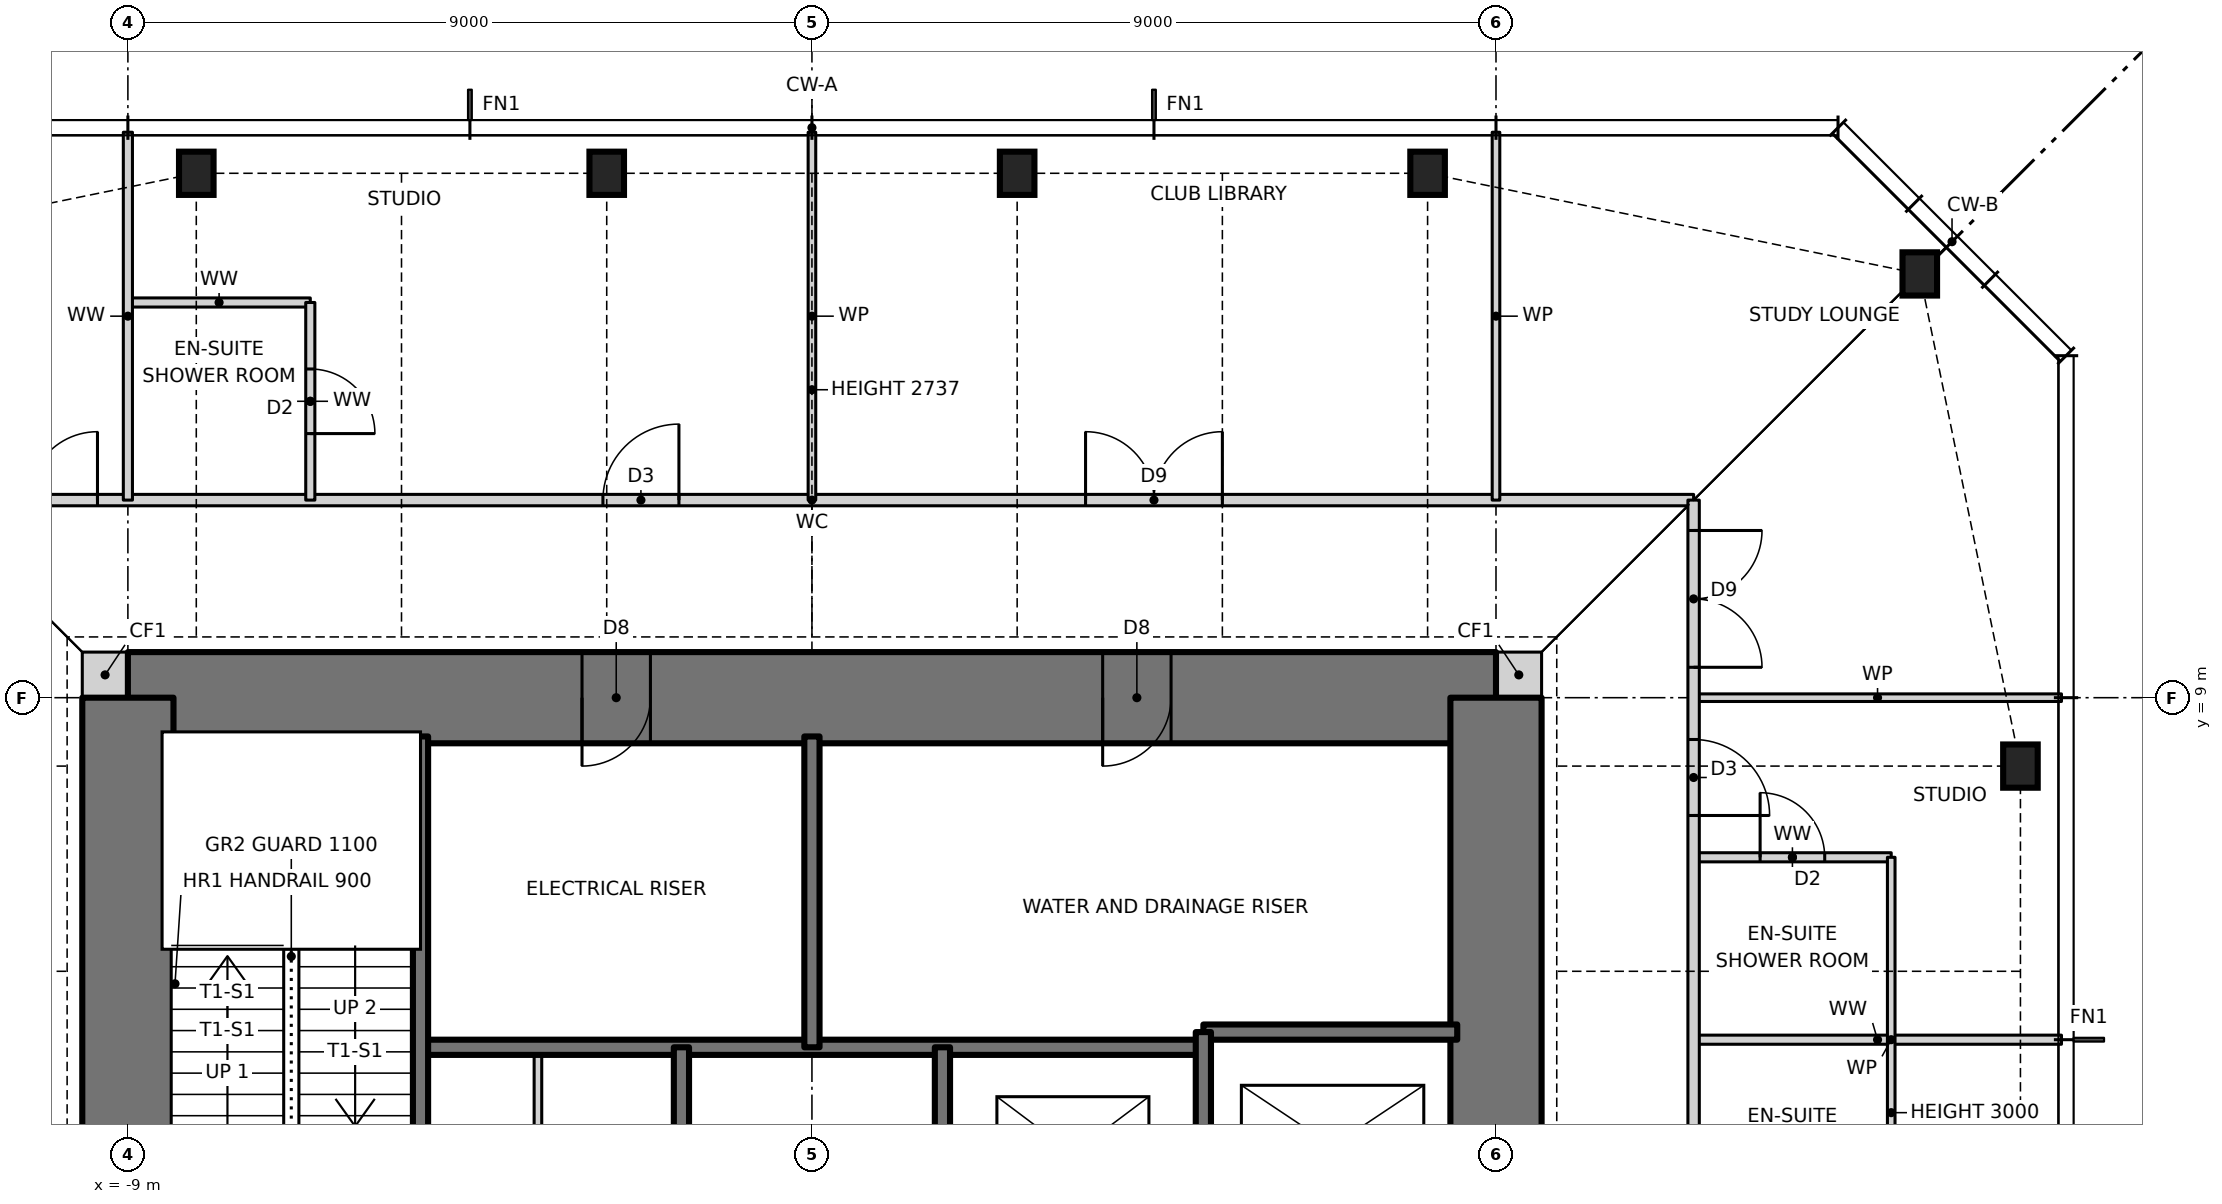
"""IFC4 building model, lengths in metres.
Left out: names, types, materials, properties, quantities, classifications, styles, units other than length and angle.
Written with IfcOpenShell. Run it as: python <this file> out.ifc"""

import sys

from ifc_helpers import new_model, si_unit, direction, frame, frame_2d, origin, origin_2d, place, context, subcontext, project, spatial, rectangle, i_section, extrude, element, fill, save


model = new_model("IFC4")
c1 = context("Model", 3, precision=1e-05, world=origin(), true_north=direction((0.0, 1.0)))
c2 = subcontext(c1, "Body", "Model", "MODEL_VIEW")
j1 = project(units=[si_unit("LENGTHUNIT", "METRE"), si_unit("PLANEANGLEUNIT", "RADIAN")], contexts=[c1])
p1 = place(None, origin())
s1 = spatial("IfcSite", under=j1, at=p1, CompositionType="ELEMENT")
p2 = place(p1, origin())
s2 = spatial("IfcBuilding", under=s1, at=p2, CompositionType="ELEMENT")
p3 = place(p2, frame((0.0, 0.0, 260.5)))
s3 = spatial("IfcBuildingStorey", under=s2, at=p3, CompositionType="ELEMENT", Elevation=260.5)
for number, where, z_axis, x_axis in (
    (1, (15.9, 8.1, 0.0), (0.0, 0.0, 1.0), (1.0, 0.0, 0.0)),
    (2, (14.576, 14.576, 0.0), (0.0, 0.0, 1.0), (1.0, 0.0, 0.0)),
    (3, (8.1, 15.9, 0.0), (0.0, 0.0, 1.0), (1.0, 0.0, 0.0)),
    (4, (2.7, 15.9, 0.0), (0.0, 0.0, 1.0), (1.0, 0.0, 0.0)),
    (5, (-2.7, 15.9, 0.0), (0.0, 0.0, 1.0), (1.0, 0.0, 0.0)),
    (6, (-8.1, 15.9, 0.0), (0.0, 0.0, 1.0), (1.0, 0.0, 0.0)),
):
    element("IfcColumn", number, at=place(p3, frame(where, z_axis=z_axis, x_axis=x_axis)), inside=s3, PredefinedType="COLUMN", context=c2, shape_type="SweptSolid", body=[
        extrude(i_section(OverallWidth=0.455, OverallDepth=0.569, WebThickness=0.078, FlangeThickness=0.125, at=origin_2d()), origin(), (0.0, 0.0, 1.0), 3.5),
    ])
for number, where, z_axis, x_axis in (
    (7, (9.0, 9.3, 0.0), (0.0, 0.0, 1.0), (1.0, 0.0, 0.0)),
    (8, (-9.6, 9.3, 0.0), (0.0, 0.0, 1.0), (1.0, 0.0, 0.0)),
):
    element("IfcWall", number, at=place(p3, frame(where, z_axis=z_axis, x_axis=x_axis)), inside=s3, PredefinedType="SOLIDWALL", context=c2, shape_type="SweptSolid", body=[
        extrude(rectangle(XDim=0.6, YDim=0.6, at=frame_2d((0.3, 0.0))), origin(), (0.0, 0.0, 1.0), 3.5),
    ])
p4 = place(p3, frame((9.0, 9.0, 0.0), z_axis=(0.0, 0.0, 1.0), x_axis=(-1.0, 0.0, 0.0)))
e9 = element("IfcWall", 9, at=p4, inside=s3, PredefinedType="SHEAR", context=c2, shape_type="SweptSolid", body=[
    extrude(rectangle(XDim=18.0, YDim=1.2, at=frame_2d((9.0, 0.0))), origin(), (0.0, 0.0, 1.0), 3.5),
])
p5 = place(p4, frame((11.125, 0.0, 0.0)))
e10 = element("IfcOpeningElement", 10, at=p5, cuts=e9, PredefinedType="OPENING", context=c2, shape_type="SweptSolid", body=[
    extrude(rectangle(XDim=0.9, YDim=2.1, at=frame_2d((0.45, 1.05))), frame((0.0, 0.61, 0.0), z_axis=(0.0, -1.0, 0.0), x_axis=(1.0, 0.0, 0.0)), (0.0, 0.0, 1.0), 1.22),
])
p6 = place(p4, frame((4.275, 0.0, 0.0)))
e11 = element("IfcOpeningElement", 11, at=p6, cuts=e9, PredefinedType="OPENING", context=c2, shape_type="SweptSolid", body=[
    extrude(rectangle(XDim=0.9, YDim=2.1, at=frame_2d((0.45, 1.05))), frame((0.0, 0.61, 0.0), z_axis=(0.0, -1.0, 0.0), x_axis=(1.0, 0.0, 0.0)), (0.0, 0.0, 1.0), 1.22),
])
p7 = place(p3, frame((9.0, -9.0, 0.0), z_axis=(0.0, 0.0, 1.0), x_axis=(0.0, 1.0, 0.0)))
e12 = element("IfcWall", 12, at=p7, inside=s3, PredefinedType="SHEAR", context=c2, shape_type="SweptSolid", body=[
    extrude(rectangle(XDim=18.0, YDim=1.2, at=frame_2d((9.0, 0.0))), origin(), (0.0, 0.0, 1.0), 3.5),
])
p8 = place(p7, frame((8.5, 0.0, 0.0)))
e13 = element("IfcOpeningElement", 13, at=p8, cuts=e12, PredefinedType="OPENING", context=c2, shape_type="SweptSolid", body=[
    extrude(rectangle(XDim=1.0, YDim=2.1, at=frame_2d((0.5, 1.05))), frame((0.0, 0.61, 0.0), z_axis=(0.0, -1.0, 0.0), x_axis=(1.0, 0.0, 0.0)), (0.0, 0.0, 1.0), 1.22),
])
p9 = place(p3, frame((-9.0, 9.0, 0.0), z_axis=(0.0, 0.0, 1.0), x_axis=(0.0, -1.0, 0.0)))
e14 = element("IfcWall", 14, at=p9, inside=s3, PredefinedType="SHEAR", context=c2, shape_type="SweptSolid", body=[
    extrude(rectangle(XDim=18.0, YDim=1.2, at=frame_2d((9.0, 0.0))), origin(), (0.0, 0.0, 1.0), 3.5),
])
p10 = place(p9, frame((8.5, 0.0, 0.0)))
e15 = element("IfcOpeningElement", 15, at=p10, cuts=e14, PredefinedType="OPENING", context=c2, shape_type="SweptSolid", body=[
    extrude(rectangle(XDim=1.0, YDim=2.1, at=frame_2d((0.5, 1.05))), frame((0.0, 0.61, 0.0), z_axis=(0.0, -1.0, 0.0), x_axis=(1.0, 0.0, 0.0)), (0.0, 0.0, 1.0), 1.22),
])
p11 = place(p3, frame((-5.15, 4.4, 0.0), z_axis=(0.0, 0.0, 1.0), x_axis=(1.0, 0.0, 0.0)))
e16 = element("IfcWall", 16, at=p11, inside=s3, PredefinedType="SOLIDWALL", context=c2, shape_type="SweptSolid", body=[
    extrude(rectangle(XDim=10.3, YDim=0.2, at=frame_2d((5.15, 0.0))), origin(), (0.0, 0.0, 1.0), 3.5),
])
p12 = place(p3, frame((11.6, 4.5, 0.0), z_axis=(0.0, 0.0, 1.0), x_axis=(1.0, 0.0, 0.0)))
e17 = element("IfcWall", 17, at=p12, inside=s3, PredefinedType="PARTITIONING", context=c2, shape_type="SweptSolid", body=[
    extrude(rectangle(XDim=4.84, YDim=0.12, at=frame_2d((2.42, 0.0))), origin(), (0.0, 0.0, 1.0), 3.27),
])
p13 = place(p3, frame((5.15, 4.6, 0.0), z_axis=(0.0, 0.0, 1.0), x_axis=(1.0, 0.0, 0.0)))
e18 = element("IfcWall", 18, at=p13, inside=s3, PredefinedType="SOLIDWALL", context=c2, shape_type="SweptSolid", body=[
    extrude(rectangle(XDim=3.34, YDim=0.2, at=frame_2d((1.67, 0.0))), origin(), (0.0, 0.0, 1.0), 3.5),
])
p14 = place(p3, frame((11.6, 6.9, 0.0), z_axis=(0.0, 0.0, 1.0), x_axis=(1.0, 0.0, 0.0)))
e19 = element("IfcWall", 19, at=p14, inside=s3, PredefinedType="PARTITIONING", context=c2, shape_type="SweptSolid", body=[
    extrude(rectangle(XDim=2.6, YDim=0.12, at=frame_2d((1.3, 0.0))), origin(), (0.0, 0.0, 1.0), 3.27),
])
p15 = place(p14, frame((0.875, 0.0, 0.0)))
e20 = element("IfcOpeningElement", 20, at=p15, cuts=e19, PredefinedType="OPENING", context=c2, shape_type="SweptSolid", body=[
    extrude(rectangle(XDim=0.85, YDim=2.1, at=frame_2d((0.425, 1.05))), frame((0.0, 0.07, 0.0), z_axis=(0.0, -1.0, 0.0), x_axis=(1.0, 0.0, 0.0)), (0.0, 0.0, 1.0), 0.14),
])
p16 = place(p3, frame((11.6, 9.0, 0.0), z_axis=(0.0, 0.0, 1.0), x_axis=(1.0, 0.0, 0.0)))
e21 = element("IfcWall", 21, at=p16, inside=s3, PredefinedType="PARTITIONING", context=c2, shape_type="SweptSolid", body=[
    extrude(rectangle(XDim=4.84, YDim=0.1, at=frame_2d((2.42, 0.0))), origin(), (0.0, 0.0, 1.0), 3.27),
])
p17 = place(p3, frame((-11.6, 11.6, 0.0), z_axis=(0.0, 0.0, 1.0), x_axis=(1.0, 0.0, 0.0)))
e22 = element("IfcWall", 22, at=p17, inside=s3, PredefinedType="PARTITIONING", context=c2, shape_type="SweptSolid", body=[
    extrude(rectangle(XDim=23.2, YDim=0.15, at=frame_2d((11.6, 0.0))), origin(), (0.0, 0.0, 1.0), 3.27),
])
p18 = place(p17, frame((15.2, 0.0, 0.0)))
e23 = element("IfcOpeningElement", 23, at=p18, cuts=e22, PredefinedType="OPENING", context=c2, shape_type="SweptSolid", body=[
    extrude(rectangle(XDim=1.8, YDim=2.1, at=frame_2d((0.9, 1.05))), frame((0.0, 0.085, 0.0), z_axis=(0.0, -1.0, 0.0), x_axis=(1.0, 0.0, 0.0)), (0.0, 0.0, 1.0), 0.17),
])
p19 = place(p17, frame((8.85, 0.0, 0.0)))
e24 = element("IfcOpeningElement", 24, at=p19, cuts=e22, PredefinedType="OPENING", context=c2, shape_type="SweptSolid", body=[
    extrude(rectangle(XDim=1.0, YDim=2.1, at=frame_2d((0.5, 1.05))), frame((0.0, 0.085, 0.0), z_axis=(0.0, -1.0, 0.0), x_axis=(1.0, 0.0, 0.0)), (0.0, 0.0, 1.0), 0.17),
])
p20 = place(p17, frame((0.4, 0.0, 0.0)))
e25 = element("IfcOpeningElement", 25, at=p20, cuts=e22, PredefinedType="OPENING", context=c2, shape_type="SweptSolid", body=[
    extrude(rectangle(XDim=1.8, YDim=2.1, at=frame_2d((0.9, 1.05))), frame((0.0, 0.085, 0.0), z_axis=(0.0, -1.0, 0.0), x_axis=(1.0, 0.0, 0.0)), (0.0, 0.0, 1.0), 0.17),
])
p21 = place(p3, frame((-9.0, 14.2, 0.0), z_axis=(0.0, 0.0, 1.0), x_axis=(1.0, 0.0, 0.0)))
e26 = element("IfcWall", 26, at=p21, inside=s3, PredefinedType="PARTITIONING", context=c2, shape_type="SweptSolid", body=[
    extrude(rectangle(XDim=2.4, YDim=0.12, at=frame_2d((1.2, 0.0))), origin(), (0.0, 0.0, 1.0), 3.27),
])
p22 = place(p3, frame((14.2, 2.1, 0.0), z_axis=(0.0, 0.0, 1.0), x_axis=(0.0, 1.0, 0.0)))
e27 = element("IfcWall", 27, at=p22, inside=s3, PredefinedType="PARTITIONING", context=c2, shape_type="SweptSolid", body=[
    extrude(rectangle(XDim=4.8, YDim=0.1, at=frame_2d((2.4, 0.0))), origin(), (0.0, 0.0, 1.0), 3.0),
])
p23 = place(p3, frame((11.6, -12.1, 0.0), z_axis=(0.0, 0.0, 1.0), x_axis=(0.0, 1.0, 0.0)))
e28 = element("IfcWall", 28, at=p23, inside=s3, PredefinedType="PARTITIONING", context=c2, shape_type="SweptSolid", body=[
    extrude(rectangle(XDim=23.7, YDim=0.15, at=frame_2d((11.85, 0.0))), origin(), (0.0, 0.0, 1.0), 3.27),
])
p24 = place(p23, frame((6.2, 0.0, 0.0)))
e29 = element("IfcOpeningElement", 29, at=p24, cuts=e28, PredefinedType="OPENING", context=c2, shape_type="SweptSolid", body=[
    extrude(rectangle(XDim=1.0, YDim=2.1, at=frame_2d((0.5, 1.05))), frame((0.0, 0.085, 0.0), z_axis=(0.0, -1.0, 0.0), x_axis=(1.0, 0.0, 0.0)), (0.0, 0.0, 1.0), 0.17),
])
p25 = place(p23, frame((12.65, 0.0, 0.0)))
e30 = element("IfcOpeningElement", 30, at=p25, cuts=e28, PredefinedType="OPENING", context=c2, shape_type="SweptSolid", body=[
    extrude(rectangle(XDim=1.0, YDim=2.1, at=frame_2d((0.5, 1.05))), frame((0.0, 0.085, 0.0), z_axis=(0.0, -1.0, 0.0), x_axis=(1.0, 0.0, 0.0)), (0.0, 0.0, 1.0), 0.17),
])
p26 = place(p23, frame((19.55, 0.0, 0.0)))
e31 = element("IfcOpeningElement", 31, at=p26, cuts=e28, PredefinedType="OPENING", context=c2, shape_type="SweptSolid", body=[
    extrude(rectangle(XDim=1.0, YDim=2.1, at=frame_2d((0.5, 1.05))), frame((0.0, 0.085, 0.0), z_axis=(0.0, -1.0, 0.0), x_axis=(1.0, 0.0, 0.0)), (0.0, 0.0, 1.0), 0.17),
])
p27 = place(p23, frame((21.5, 0.0, 0.0)))
e32 = element("IfcOpeningElement", 32, at=p27, cuts=e28, PredefinedType="OPENING", context=c2, shape_type="SweptSolid", body=[
    extrude(rectangle(XDim=1.8, YDim=2.1, at=frame_2d((0.9, 1.05))), frame((0.0, 0.085, 0.0), z_axis=(0.0, -1.0, 0.0), x_axis=(1.0, 0.0, 0.0)), (0.0, 0.0, 1.0), 0.17),
])
p28 = place(p23, frame((1.125, 0.0, 0.0)))
e33 = element("IfcOpeningElement", 33, at=p28, cuts=e28, PredefinedType="OPENING", context=c2, shape_type="SweptSolid", body=[
    extrude(rectangle(XDim=0.85, YDim=2.1, at=frame_2d((0.425, 1.05))), frame((0.0, 0.085, 0.0), z_axis=(0.0, -1.0, 0.0), x_axis=(1.0, 0.0, 0.0)), (0.0, 0.0, 1.0), 0.17),
])
p29 = place(p3, frame((9.0, 11.6, 0.0), z_axis=(0.0, 0.0, 1.0), x_axis=(0.0, 1.0, 0.0)))
e34 = element("IfcWall", 34, at=p29, inside=s3, PredefinedType="PARTITIONING", context=c2, shape_type="SweptSolid", body=[
    extrude(rectangle(XDim=4.84, YDim=0.1, at=frame_2d((2.42, 0.0))), origin(), (0.0, 0.0, 1.0), 3.27),
])
p30 = place(p3, frame((5.15, -8.49, 0.0), z_axis=(0.0, 0.0, 1.0), x_axis=(0.0, 1.0, 0.0)))
e35 = element("IfcWall", 35, at=p30, inside=s3, PredefinedType="SOLIDWALL", context=c2, shape_type="SweptSolid", body=[
    extrude(rectangle(XDim=13.09, YDim=0.2, at=frame_2d((6.545, 0.0))), origin(), (0.0, 0.0, 1.0), 3.5),
])
p31 = place(p30, frame((7.89, 0.0, 0.0)))
e36 = element("IfcOpeningElement", 36, at=p31, cuts=e35, PredefinedType="OPENING", context=c2, shape_type="SweptSolid", body=[
    extrude(rectangle(XDim=1.2, YDim=2.1, at=frame_2d((0.6, 1.05))), frame((0.0, 0.11, 0.0), z_axis=(0.0, -1.0, 0.0), x_axis=(1.0, 0.0, 0.0)), (0.0, 0.0, 1.0), 0.22),
])
p32 = place(p3, frame((1.717, 1.6, 0.0), z_axis=(0.0, 0.0, 1.0), x_axis=(0.0, 1.0, 0.0)))
e37 = element("IfcWall", 37, at=p32, inside=s3, PredefinedType="SOLIDWALL", context=c2, shape_type="SweptSolid", body=[
    extrude(rectangle(XDim=2.8, YDim=0.2, at=frame_2d((1.4, 0.0))), origin(), (0.0, 0.0, 1.0), 3.5),
])
p33 = place(p3, frame((0.0, 4.4, 0.0), z_axis=(0.0, 0.0, 1.0), x_axis=(0.0, 1.0, 0.0)))
e38 = element("IfcWall", 38, at=p33, inside=s3, PredefinedType="SOLIDWALL", context=c2, shape_type="SweptSolid", body=[
    extrude(rectangle(XDim=4.09, YDim=0.2, at=frame_2d((2.045, 0.0))), origin(), (0.0, 0.0, 1.0), 3.5),
])
p34 = place(p3, frame((0.0, 11.6, 0.0), z_axis=(0.0, 0.0, 1.0), x_axis=(0.0, 1.0, 0.0)))
e39 = element("IfcWall", 39, at=p34, inside=s3, PredefinedType="PARTITIONING", context=c2, shape_type="SweptSolid", body=[
    extrude(rectangle(XDim=4.84, YDim=0.1, at=frame_2d((2.42, 0.0))), origin(), (0.0, 0.0, 1.0), 2.737),
])
p35 = place(p3, frame((-1.717, 1.6, 0.0), z_axis=(0.0, 0.0, 1.0), x_axis=(0.0, 1.0, 0.0)))
e40 = element("IfcWall", 40, at=p35, inside=s3, PredefinedType="SOLIDWALL", context=c2, shape_type="SweptSolid", body=[
    extrude(rectangle(XDim=2.8, YDim=0.2, at=frame_2d((1.4, 0.0))), origin(), (0.0, 0.0, 1.0), 3.5),
])
p36 = place(p3, frame((-3.605, 1.6, 0.0), z_axis=(0.0, 0.0, 1.0), x_axis=(0.0, 1.0, 0.0)))
e41 = element("IfcWall", 41, at=p36, inside=s3, PredefinedType="PARTITIONING", context=c2, shape_type="SweptSolid", body=[
    extrude(rectangle(XDim=2.8, YDim=0.1, at=frame_2d((1.4, 0.0))), origin(), (0.0, 0.0, 1.0), 3.3),
])
p37 = place(p3, frame((-5.15, 1.6, 0.0), z_axis=(0.0, 0.0, 1.0), x_axis=(0.0, 1.0, 0.0)))
e42 = element("IfcWall", 42, at=p37, inside=s3, PredefinedType="SOLIDWALL", context=c2, shape_type="SweptSolid", body=[
    extrude(rectangle(XDim=6.89, YDim=0.2, at=frame_2d((3.445, 0.0))), origin(), (0.0, 0.0, 1.0), 3.5),
])
p38 = place(p3, frame((-6.6, 11.6, 0.0), z_axis=(0.0, 0.0, 1.0), x_axis=(0.0, 1.0, 0.0)))
e43 = element("IfcWall", 43, at=p38, inside=s3, PredefinedType="PARTITIONING", context=c2, shape_type="SweptSolid", body=[
    extrude(rectangle(XDim=2.6, YDim=0.12, at=frame_2d((1.3, 0.0))), origin(), (0.0, 0.0, 1.0), 3.27),
])
p39 = place(p38, frame((0.875, 0.0, 0.0)))
e44 = element("IfcOpeningElement", 44, at=p39, cuts=e43, PredefinedType="OPENING", context=c2, shape_type="SweptSolid", body=[
    extrude(rectangle(XDim=0.85, YDim=2.1, at=frame_2d((0.425, 1.05))), frame((0.0, 0.07, 0.0), z_axis=(0.0, -1.0, 0.0), x_axis=(1.0, 0.0, 0.0)), (0.0, 0.0, 1.0), 0.14),
])
p40 = place(p3, frame((-9.0, 11.6, 0.0), z_axis=(0.0, 0.0, 1.0), x_axis=(0.0, 1.0, 0.0)))
e45 = element("IfcWall", 45, at=p40, inside=s3, PredefinedType="PARTITIONING", context=c2, shape_type="SweptSolid", body=[
    extrude(rectangle(XDim=4.84, YDim=0.12, at=frame_2d((2.42, 0.0))), origin(), (0.0, 0.0, 1.0), 3.27),
])
p41 = place(p26, frame((1.0, 0.0, 0.0), z_axis=(0.0, 0.0, 1.0), x_axis=(-1.0, 0.0, 0.0)))
e46 = element("IfcDoor", 46, at=p41, inside=s3, OperationType="SINGLE_SWING_RIGHT", PredefinedType="DOOR", context=c2, shape_type="SweptSolid", body=[
    extrude(rectangle(XDim=1.0, YDim=2.1, at=frame_2d((0.5, 1.05))), frame((0.0, 0.025, 0.0), z_axis=(0.0, -1.0, 0.0), x_axis=(1.0, 0.0, 0.0)), (0.0, 0.0, 1.0), 0.05),
])
fill(e31, e46)
p42 = place(p15, origin())
e47 = element("IfcDoor", 47, at=p42, inside=s3, OperationType="SINGLE_SWING_LEFT", PredefinedType="DOOR", context=c2, shape_type="SweptSolid", body=[
    extrude(rectangle(XDim=0.85, YDim=2.1, at=frame_2d((0.425, 1.05))), frame((0.0, 0.025, 0.0), z_axis=(0.0, -1.0, 0.0), x_axis=(1.0, 0.0, 0.0)), (0.0, 0.0, 1.0), 0.05),
])
fill(e20, e47)
p43 = place(p18, origin())
e48 = element("IfcDoor", 48, at=p43, inside=s3, OperationType="DOUBLE_DOOR_SINGLE_SWING", PredefinedType="DOOR", context=c2, shape_type="SweptSolid", body=[
    extrude(rectangle(XDim=1.8, YDim=2.1, at=frame_2d((0.9, 1.05))), frame((0.0, 0.025, 0.0), z_axis=(0.0, -1.0, 0.0), x_axis=(1.0, 0.0, 0.0)), (0.0, 0.0, 1.0), 0.05),
])
fill(e23, e48)
p44 = place(p19, origin())
e49 = element("IfcDoor", 49, at=p44, inside=s3, OperationType="SINGLE_SWING_RIGHT", PredefinedType="DOOR", context=c2, shape_type="SweptSolid", body=[
    extrude(rectangle(XDim=1.0, YDim=2.1, at=frame_2d((0.5, 1.05))), frame((0.0, 0.025, 0.0), z_axis=(0.0, -1.0, 0.0), x_axis=(1.0, 0.0, 0.0)), (0.0, 0.0, 1.0), 0.05),
])
fill(e24, e49)
p45 = place(p39, frame((0.85, 0.0, 0.0), z_axis=(0.0, 0.0, 1.0), x_axis=(-1.0, 0.0, 0.0)))
e50 = element("IfcDoor", 50, at=p45, inside=s3, OperationType="SINGLE_SWING_RIGHT", PredefinedType="DOOR", context=c2, shape_type="SweptSolid", body=[
    extrude(rectangle(XDim=0.85, YDim=2.1, at=frame_2d((0.425, 1.05))), frame((0.0, 0.025, 0.0), z_axis=(0.0, -1.0, 0.0), x_axis=(1.0, 0.0, 0.0)), (0.0, 0.0, 1.0), 0.05),
])
fill(e44, e50)
p46 = place(p27, frame((1.8, 0.0, 0.0), z_axis=(0.0, 0.0, 1.0), x_axis=(-1.0, 0.0, 0.0)))
e51 = element("IfcDoor", 51, at=p46, inside=s3, OperationType="DOUBLE_DOOR_SINGLE_SWING", PredefinedType="DOOR", context=c2, shape_type="SweptSolid", body=[
    extrude(rectangle(XDim=1.8, YDim=2.1, at=frame_2d((0.9, 1.05))), frame((0.0, 0.025, 0.0), z_axis=(0.0, -1.0, 0.0), x_axis=(1.0, 0.0, 0.0)), (0.0, 0.0, 1.0), 0.05),
])
fill(e32, e51)
p47 = place(p20, origin())
e52 = element("IfcDoor", 52, at=p47, inside=s3, OperationType="DOUBLE_DOOR_SINGLE_SWING", PredefinedType="DOOR", context=c2, shape_type="SweptSolid", body=[
    extrude(rectangle(XDim=1.8, YDim=2.1, at=frame_2d((0.9, 1.05))), frame((0.0, 0.025, 0.0), z_axis=(0.0, -1.0, 0.0), x_axis=(1.0, 0.0, 0.0)), (0.0, 0.0, 1.0), 0.05),
])
fill(e25, e52)
p48 = place(p5, origin())
e53 = element("IfcDoor", 53, at=p48, inside=s3, OperationType="SINGLE_SWING_RIGHT", PredefinedType="DOOR", context=c2, shape_type="SweptSolid", body=[
    extrude(rectangle(XDim=0.9, YDim=2.1, at=frame_2d((0.45, 1.05))), frame((0.0, 0.025, 0.0), z_axis=(0.0, -1.0, 0.0), x_axis=(1.0, 0.0, 0.0)), (0.0, 0.0, 1.0), 0.05),
])
fill(e10, e53)
p49 = place(p6, origin())
e54 = element("IfcDoor", 54, at=p49, inside=s3, OperationType="SINGLE_SWING_RIGHT", PredefinedType="DOOR", context=c2, shape_type="SweptSolid", body=[
    extrude(rectangle(XDim=0.9, YDim=2.1, at=frame_2d((0.45, 1.05))), frame((0.0, 0.025, 0.0), z_axis=(0.0, -1.0, 0.0), x_axis=(1.0, 0.0, 0.0)), (0.0, 0.0, 1.0), 0.05),
])
fill(e11, e54)
save(model, sys.argv[1])
